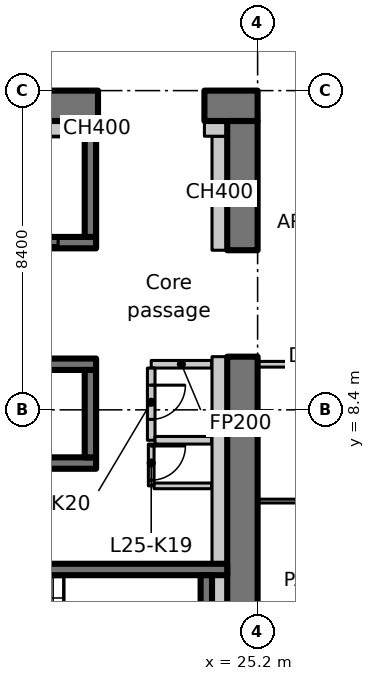
"""IFC4 building model, lengths in metres.
Left out: names, types, materials, properties, quantities, classifications, styles, units other than length and angle.
Written with IfcOpenShell. Run it as: python <this file> out.ifc"""

import sys

from ifc_helpers import new_model, si_unit, direction, frame, frame_2d, origin, place, context, subcontext, project, spatial, rectangle, extrude, element, fill, save


model = new_model("IFC4")
c1 = context("Model", 3, precision=1e-05, world=origin(), true_north=direction((0.0, 1.0)))
c2 = subcontext(c1, "Body", "Model", "MODEL_VIEW")
j1 = project(units=[si_unit("LENGTHUNIT", "METRE"), si_unit("PLANEANGLEUNIT", "RADIAN")], contexts=[c1])
p1 = place(None, origin())
s1 = spatial("IfcSite", under=j1, at=p1, CompositionType="ELEMENT")
p2 = place(p1, origin())
s2 = spatial("IfcBuilding", under=s1, at=p2, CompositionType="ELEMENT")
p3 = place(p2, frame((0.0, 0.0, 106.1)))
s3 = spatial("IfcBuildingStorey", under=s2, at=p3, CompositionType="ELEMENT", Elevation=106.1)
p4 = place(p3, frame((-1.1, 16.4, 0.0), z_axis=(0.0, 0.0, 1.0), x_axis=(1.0, 0.0, 0.0)))
e1 = element("IfcWall", 1, at=p4, inside=s3, PredefinedType="SHEAR", context=c2, shape_type="SweptSolid", body=[
    extrude(rectangle(XDim=22.1, YDim=0.8, at=frame_2d((11.05, 0.0))), origin(), (0.0, 0.0, 1.0), 3.35),
])
p5 = place(p4, frame((3.15, 0.0, 0.0)))
e2 = element("IfcOpeningElement", 2, at=p5, cuts=e1, PredefinedType="OPENING", context=c2, shape_type="SweptSolid", body=[
    extrude(rectangle(XDim=1.1, YDim=2.3, at=frame_2d((0.55, 1.15))), frame((0.0, 0.41, 0.0), z_axis=(0.0, -1.0, 0.0), x_axis=(1.0, 0.0, 0.0)), (0.0, 0.0, 1.0), 0.82),
])
p6 = place(p3, frame((23.8, 16.4, 0.0), z_axis=(0.0, 0.0, 1.0), x_axis=(1.0, 0.0, 0.0)))
e3 = element("IfcWall", 3, at=p6, inside=s3, PredefinedType="SHEAR", context=c2, shape_type="SweptSolid", body=[
    extrude(rectangle(XDim=1.4, YDim=0.8, at=frame_2d((0.7, 0.0))), origin(), (0.0, 0.0, 1.0), 3.35),
])
p7 = place(p3, frame((24.8, 0.8, 0.0), z_axis=(0.0, 0.0, 1.0), x_axis=(0.0, 1.0, 0.0)))
e4 = element("IfcWall", 4, at=p7, inside=s3, PredefinedType="SHEAR", context=c2, shape_type="SweptSolid", body=[
    extrude(rectangle(XDim=9.0, YDim=0.8, at=frame_2d((4.5, 0.0))), origin(), (0.0, 0.0, 1.0), 3.35),
])
p8 = place(p3, frame((24.8, 12.6, 0.0), z_axis=(0.0, 0.0, 1.0), x_axis=(0.0, 1.0, 0.0)))
e5 = element("IfcWall", 5, at=p8, inside=s3, PredefinedType="SHEAR", context=c2, shape_type="SweptSolid", body=[
    extrude(rectangle(XDim=3.4, YDim=0.8, at=frame_2d((1.7, 0.0))), origin(), (0.0, 0.0, 1.0), 3.35),
])
p9 = place(p3, frame((24.2, 12.6, 0.0), z_axis=(0.0, 0.0, 1.0), x_axis=(0.0, 1.0, 0.0)))
e6 = element("IfcWall", 6, at=p9, inside=s3, PredefinedType="PARTITIONING", context=c2, shape_type="SweptSolid", body=[
    extrude(rectangle(XDim=3.0, YDim=0.4, at=frame_2d((1.5, 0.0))), origin(), (0.0, 0.0, 1.0), 3.35),
])
p10 = place(p3, frame((23.8, 15.8, 0.0), z_axis=(0.0, 0.0, 1.0), x_axis=(1.0, 0.0, 0.0)))
e7 = element("IfcWall", 7, at=p10, inside=s3, PredefinedType="PARTITIONING", context=c2, shape_type="SweptSolid", body=[
    extrude(rectangle(XDim=0.6, YDim=0.4, at=frame_2d((0.3, 0.0))), origin(), (0.0, 0.0, 1.0), 3.35),
])
p11 = place(p3, frame((0.8, 7.0, 0.0), z_axis=(0.0, 0.0, 1.0), x_axis=(1.0, 0.0, 0.0)))
e8 = element("IfcWall", 8, at=p11, inside=s3, PredefinedType="SHEAR", context=c2, shape_type="SweptSolid", body=[
    extrude(rectangle(XDim=20.15, YDim=0.3, at=frame_2d((10.075, 0.0))), origin(), (0.0, 0.0, 1.0), 3.35),
])
p12 = place(p3, frame((0.8, 9.6, 0.0), z_axis=(0.0, 0.0, 1.0), x_axis=(1.0, 0.0, 0.0)))
e9 = element("IfcWall", 9, at=p12, inside=s3, PredefinedType="SHEAR", context=c2, shape_type="SweptSolid", body=[
    extrude(rectangle(XDim=20.15, YDim=0.3, at=frame_2d((10.075, 0.0))), origin(), (0.0, 0.0, 1.0), 3.35),
])
p13 = place(p12, frame((1.25, 0.0, 0.0)))
e10 = element("IfcOpeningElement", 10, at=p13, cuts=e9, PredefinedType="OPENING", context=c2, shape_type="SweptSolid", body=[
    extrude(rectangle(XDim=1.1, YDim=2.3, at=frame_2d((0.55, 1.15))), frame((0.0, 0.16, 0.0), z_axis=(0.0, -1.0, 0.0), x_axis=(1.0, 0.0, 0.0)), (0.0, 0.0, 1.0), 0.32),
])
p14 = place(p12, frame((4.05, 0.0, 0.0)))
e11 = element("IfcOpeningElement", 11, at=p14, cuts=e9, PredefinedType="OPENING", context=c2, shape_type="SweptSolid", body=[
    extrude(rectangle(XDim=1.1, YDim=2.3, at=frame_2d((0.55, 1.15))), frame((0.0, 0.16, 0.0), z_axis=(0.0, -1.0, 0.0), x_axis=(1.0, 0.0, 0.0)), (0.0, 0.0, 1.0), 0.32),
])
p15 = place(p12, frame((6.85, 0.0, 0.0)))
e12 = element("IfcOpeningElement", 12, at=p15, cuts=e9, PredefinedType="OPENING", context=c2, shape_type="SweptSolid", body=[
    extrude(rectangle(XDim=1.1, YDim=2.3, at=frame_2d((0.55, 1.15))), frame((0.0, 0.16, 0.0), z_axis=(0.0, -1.0, 0.0), x_axis=(1.0, 0.0, 0.0)), (0.0, 0.0, 1.0), 0.32),
])
p16 = place(p12, frame((9.65, 0.0, 0.0)))
e13 = element("IfcOpeningElement", 13, at=p16, cuts=e9, PredefinedType="OPENING", context=c2, shape_type="SweptSolid", body=[
    extrude(rectangle(XDim=1.1, YDim=2.3, at=frame_2d((0.55, 1.15))), frame((0.0, 0.16, 0.0), z_axis=(0.0, -1.0, 0.0), x_axis=(1.0, 0.0, 0.0)), (0.0, 0.0, 1.0), 0.32),
])
p17 = place(p12, frame((12.45, 0.0, 0.0)))
e14 = element("IfcOpeningElement", 14, at=p17, cuts=e9, PredefinedType="OPENING", context=c2, shape_type="SweptSolid", body=[
    extrude(rectangle(XDim=1.1, YDim=2.3, at=frame_2d((0.55, 1.15))), frame((0.0, 0.16, 0.0), z_axis=(0.0, -1.0, 0.0), x_axis=(1.0, 0.0, 0.0)), (0.0, 0.0, 1.0), 0.32),
])
p18 = place(p12, frame((15.25, 0.0, 0.0)))
e15 = element("IfcOpeningElement", 15, at=p18, cuts=e9, PredefinedType="OPENING", context=c2, shape_type="SweptSolid", body=[
    extrude(rectangle(XDim=1.1, YDim=2.3, at=frame_2d((0.55, 1.15))), frame((0.0, 0.16, 0.0), z_axis=(0.0, -1.0, 0.0), x_axis=(1.0, 0.0, 0.0)), (0.0, 0.0, 1.0), 0.32),
])
p19 = place(p3, frame((20.8, 7.15, 0.0), z_axis=(0.0, 0.0, 1.0), x_axis=(0.0, 1.0, 0.0)))
e16 = element("IfcWall", 16, at=p19, inside=s3, PredefinedType="SHEAR", context=c2, shape_type="SweptSolid", body=[
    extrude(rectangle(XDim=2.3, YDim=0.3, at=frame_2d((1.15, 0.0))), origin(), (0.0, 0.0, 1.0), 3.35),
])
p20 = place(p3, frame((15.05, 12.8, 0.0), z_axis=(0.0, 0.0, 1.0), x_axis=(1.0, 0.0, 0.0)))
e17 = element("IfcWall", 17, at=p20, inside=s3, PredefinedType="SHEAR", context=c2, shape_type="SweptSolid", body=[
    extrude(rectangle(XDim=5.9, YDim=0.3, at=frame_2d((2.95, 0.0))), origin(), (0.0, 0.0, 1.0), 3.35),
])
p21 = place(p20, frame((3.8, 0.0, 0.0)))
e18 = element("IfcOpeningElement", 18, at=p21, cuts=e17, PredefinedType="OPENING", context=c2, shape_type="SweptSolid", body=[
    extrude(rectangle(XDim=1.1, YDim=2.3, at=frame_2d((0.55, 1.15))), frame((0.0, 0.16, 0.0), z_axis=(0.0, -1.0, 0.0), x_axis=(1.0, 0.0, 0.0)), (0.0, 0.0, 1.0), 0.32),
])
p22 = place(p3, frame((20.8, 12.95, 0.0), z_axis=(0.0, 0.0, 1.0), x_axis=(0.0, 1.0, 0.0)))
e19 = element("IfcWall", 19, at=p22, inside=s3, PredefinedType="SHEAR", context=c2, shape_type="SweptSolid", body=[
    extrude(rectangle(XDim=3.05, YDim=0.3, at=frame_2d((1.525, 0.0))), origin(), (0.0, 0.0, 1.0), 3.35),
])
p23 = place(p3, frame((15.8, 4.2, 0.0), z_axis=(0.0, 0.0, 1.0), x_axis=(1.0, 0.0, 0.0)))
e20 = element("IfcWall", 20, at=p23, inside=s3, PredefinedType="SHEAR", context=c2, shape_type="SweptSolid", body=[
    extrude(rectangle(XDim=8.6, YDim=0.3, at=frame_2d((4.3, 0.0))), origin(), (0.0, 0.0, 1.0), 3.35),
])
p24 = place(p23, frame((0.4, 0.0, 0.0)))
e21 = element("IfcOpeningElement", 21, at=p24, cuts=e20, PredefinedType="OPENING", context=c2, shape_type="SweptSolid", body=[
    extrude(rectangle(XDim=1.0, YDim=2.1, at=frame_2d((0.5, 1.05))), frame((0.0, 0.16, 0.0), z_axis=(0.0, -1.0, 0.0), x_axis=(1.0, 0.0, 0.0)), (0.0, 0.0, 1.0), 0.32),
])
p25 = place(p3, frame((23.85, 1.5, 0.0), z_axis=(0.0, 0.0, 1.0), x_axis=(0.0, 1.0, 0.0)))
e22 = element("IfcWall", 22, at=p25, inside=s3, PredefinedType="SHEAR", context=c2, shape_type="SweptSolid", body=[
    extrude(rectangle(XDim=2.55, YDim=0.3, at=frame_2d((1.275, 0.0))), origin(), (0.0, 0.0, 1.0), 3.35),
])
p26 = place(p3, frame((23.988, 9.6, 0.0), z_axis=(0.0, 0.0, 1.0), x_axis=(-1.0, 0.0, 0.0)))
e23 = element("IfcWall", 23, at=p26, inside=s3, PredefinedType="PARTITIONING", context=c2, shape_type="SweptSolid", body=[
    extrude(rectangle(XDim=1.588, YDim=0.2, at=frame_2d((0.794, 0.0))), origin(), (0.0, 0.0, 1.0), 3.35),
])
p27 = place(p3, frame((22.4, 9.5, 0.0), z_axis=(0.0, 0.0, 1.0), x_axis=(0.0, -1.0, 0.0)))
e24 = element("IfcWall", 24, at=p27, inside=s3, PredefinedType="PARTITIONING", context=c2, shape_type="SweptSolid", body=[
    extrude(rectangle(XDim=1.9, YDim=0.2, at=frame_2d((0.95, 0.0))), origin(), (0.0, 0.0, 1.0), 3.35),
])
p28 = place(p27, frame((0.45, 0.0, 0.0)))
e25 = element("IfcOpeningElement", 25, at=p28, cuts=e24, PredefinedType="OPENING", context=c2, shape_type="SweptSolid", body=[
    extrude(rectangle(XDim=0.9, YDim=2.1, at=frame_2d((0.45, 1.05))), frame((0.0, 0.11, 0.0), z_axis=(0.0, -1.0, 0.0), x_axis=(1.0, 0.0, 0.0)), (0.0, 0.0, 1.0), 0.22),
])
p29 = place(p3, frame((22.5, 7.6, 0.0), z_axis=(0.0, 0.0, 1.0), x_axis=(1.0, 0.0, 0.0)))
e26 = element("IfcWall", 26, at=p29, inside=s3, PredefinedType="PARTITIONING", context=c2, shape_type="SweptSolid", body=[
    extrude(rectangle(XDim=1.488, YDim=0.2, at=frame_2d((0.744, 0.0))), origin(), (0.0, 0.0, 1.0), 3.35),
])
p30 = place(p3, frame((22.4, 7.5, 0.0), z_axis=(0.0, 0.0, 1.0), x_axis=(0.0, -1.0, 0.0)))
e27 = element("IfcWall", 27, at=p30, inside=s3, PredefinedType="PARTITIONING", context=c2, shape_type="SweptSolid", body=[
    extrude(rectangle(XDim=1.1, YDim=0.15, at=frame_2d((0.55, 0.0))), origin(), (0.0, 0.0, 1.0), 3.35),
])
p31 = place(p30, frame((0.05, 0.0, 0.0)))
e28 = element("IfcOpeningElement", 28, at=p31, cuts=e27, PredefinedType="OPENING", context=c2, shape_type="SweptSolid", body=[
    extrude(rectangle(XDim=0.9, YDim=2.1, at=frame_2d((0.45, 1.05))), frame((0.0, 0.085, 0.0), z_axis=(0.0, -1.0, 0.0), x_axis=(1.0, 0.0, 0.0)), (0.0, 0.0, 1.0), 0.17),
])
p32 = place(p3, frame((22.475, 6.4, 0.0), z_axis=(0.0, 0.0, 1.0), x_axis=(1.0, 0.0, 0.0)))
e29 = element("IfcWall", 29, at=p32, inside=s3, PredefinedType="PARTITIONING", context=c2, shape_type="SweptSolid", body=[
    extrude(rectangle(XDim=1.513, YDim=0.15, at=frame_2d((0.756, 0.0))), origin(), (0.0, 0.0, 1.0), 3.35),
])
p33 = place(p3, frame((18.15, 15.8, 0.0), z_axis=(0.0, 0.0, 1.0), x_axis=(1.0, 0.0, 0.0)))
e30 = element("IfcWall", 30, at=p33, inside=s3, PredefinedType="PARTITIONING", context=c2, shape_type="SweptSolid", body=[
    extrude(rectangle(XDim=2.5, YDim=0.4, at=frame_2d((1.25, 0.0))), origin(), (0.0, 0.0, 1.0), 3.35),
])
p34 = place(p3, frame((20.95, 15.8, 0.0), z_axis=(0.0, 0.0, 1.0), x_axis=(1.0, 0.0, 0.0)))
e31 = element("IfcWall", 31, at=p34, inside=s3, PredefinedType="PARTITIONING", context=c2, shape_type="SweptSolid", body=[
    extrude(rectangle(XDim=0.05, YDim=0.4, at=frame_2d((0.025, 0.0))), origin(), (0.0, 0.0, 1.0), 3.35),
])
p35 = place(p3, frame((24.2, 1.5, 0.0), z_axis=(0.0, 0.0, 1.0), x_axis=(0.0, 1.0, 0.0)))
e32 = element("IfcWall", 32, at=p35, inside=s3, PredefinedType="PARTITIONING", context=c2, shape_type="SweptSolid", body=[
    extrude(rectangle(XDim=2.55, YDim=0.4, at=frame_2d((1.275, 0.0))), origin(), (0.0, 0.0, 1.0), 3.35),
])
p36 = place(p3, frame((24.2, 4.35, 0.0), z_axis=(0.0, 0.0, 1.0), x_axis=(0.0, 1.0, 0.0)))
e33 = element("IfcWall", 33, at=p36, inside=s3, PredefinedType="PARTITIONING", context=c2, shape_type="SweptSolid", body=[
    extrude(rectangle(XDim=5.45, YDim=0.4, at=frame_2d((2.725, 0.0))), origin(), (0.0, 0.0, 1.0), 3.35),
])
p37 = place(p3, frame((29.4, 9.6, 0.0), z_axis=(0.0, 0.0, 1.0), x_axis=(-1.0, 0.0, 0.0)))
e34 = element("IfcWall", 34, at=p37, inside=s3, PredefinedType="PARTITIONING", context=c2, shape_type="SweptSolid", body=[
    extrude(rectangle(XDim=4.2, YDim=0.15, at=frame_2d((2.1, 0.0))), origin(), (0.0, 0.0, 1.0), 3.33),
])
p38 = place(p3, frame((25.2, 6.0, 0.0), z_axis=(0.0, 0.0, 1.0), x_axis=(1.0, 0.0, 0.0)))
e35 = element("IfcWall", 35, at=p38, inside=s3, PredefinedType="PARTITIONING", context=c2, shape_type="SweptSolid", body=[
    extrude(rectangle(XDim=4.2, YDim=0.1, at=frame_2d((2.1, 0.0))), origin(), (0.0, 0.0, 1.0), 3.33),
])
p39 = place(p38, frame((1.5, 0.0, 0.0)))
e36 = element("IfcOpeningElement", 36, at=p39, cuts=e35, PredefinedType="OPENING", context=c2, shape_type="SweptSolid", body=[
    extrude(rectangle(XDim=0.9, YDim=2.1, at=frame_2d((0.45, 1.05))), frame((0.0, 0.06, 0.0), z_axis=(0.0, -1.0, 0.0), x_axis=(1.0, 0.0, 0.0)), (0.0, 0.0, 1.0), 0.12),
])
p40 = place(p21, origin())
e37 = element("IfcDoor", 37, at=p40, inside=s3, OperationType="SLIDING_TO_LEFT", PredefinedType="DOOR", context=c2, shape_type="SweptSolid", body=[
    extrude(rectangle(XDim=1.1, YDim=2.3, at=frame_2d((0.55, 1.15))), frame((0.0, 0.025, 0.0), z_axis=(0.0, -1.0, 0.0), x_axis=(1.0, 0.0, 0.0)), (0.0, 0.0, 1.0), 0.05),
])
fill(e18, e37)
p41 = place(p31, origin())
e38 = element("IfcDoor", 38, at=p41, inside=s3, OperationType="SINGLE_SWING_LEFT", PredefinedType="DOOR", context=c2, shape_type="SweptSolid", body=[
    extrude(rectangle(XDim=0.9, YDim=2.1, at=frame_2d((0.45, 1.05))), frame((0.0, 0.025, 0.0), z_axis=(0.0, -1.0, 0.0), x_axis=(1.0, 0.0, 0.0)), (0.0, 0.0, 1.0), 0.05),
])
fill(e28, e38)
p42 = place(p28, origin())
e39 = element("IfcDoor", 39, at=p42, inside=s3, OperationType="SINGLE_SWING_RIGHT", PredefinedType="DOOR", context=c2, shape_type="SweptSolid", body=[
    extrude(rectangle(XDim=0.9, YDim=2.1, at=frame_2d((0.45, 1.05))), frame((0.0, 0.025, 0.0), z_axis=(0.0, -1.0, 0.0), x_axis=(1.0, 0.0, 0.0)), (0.0, 0.0, 1.0), 0.05),
])
fill(e25, e39)
save(model, sys.argv[1])
